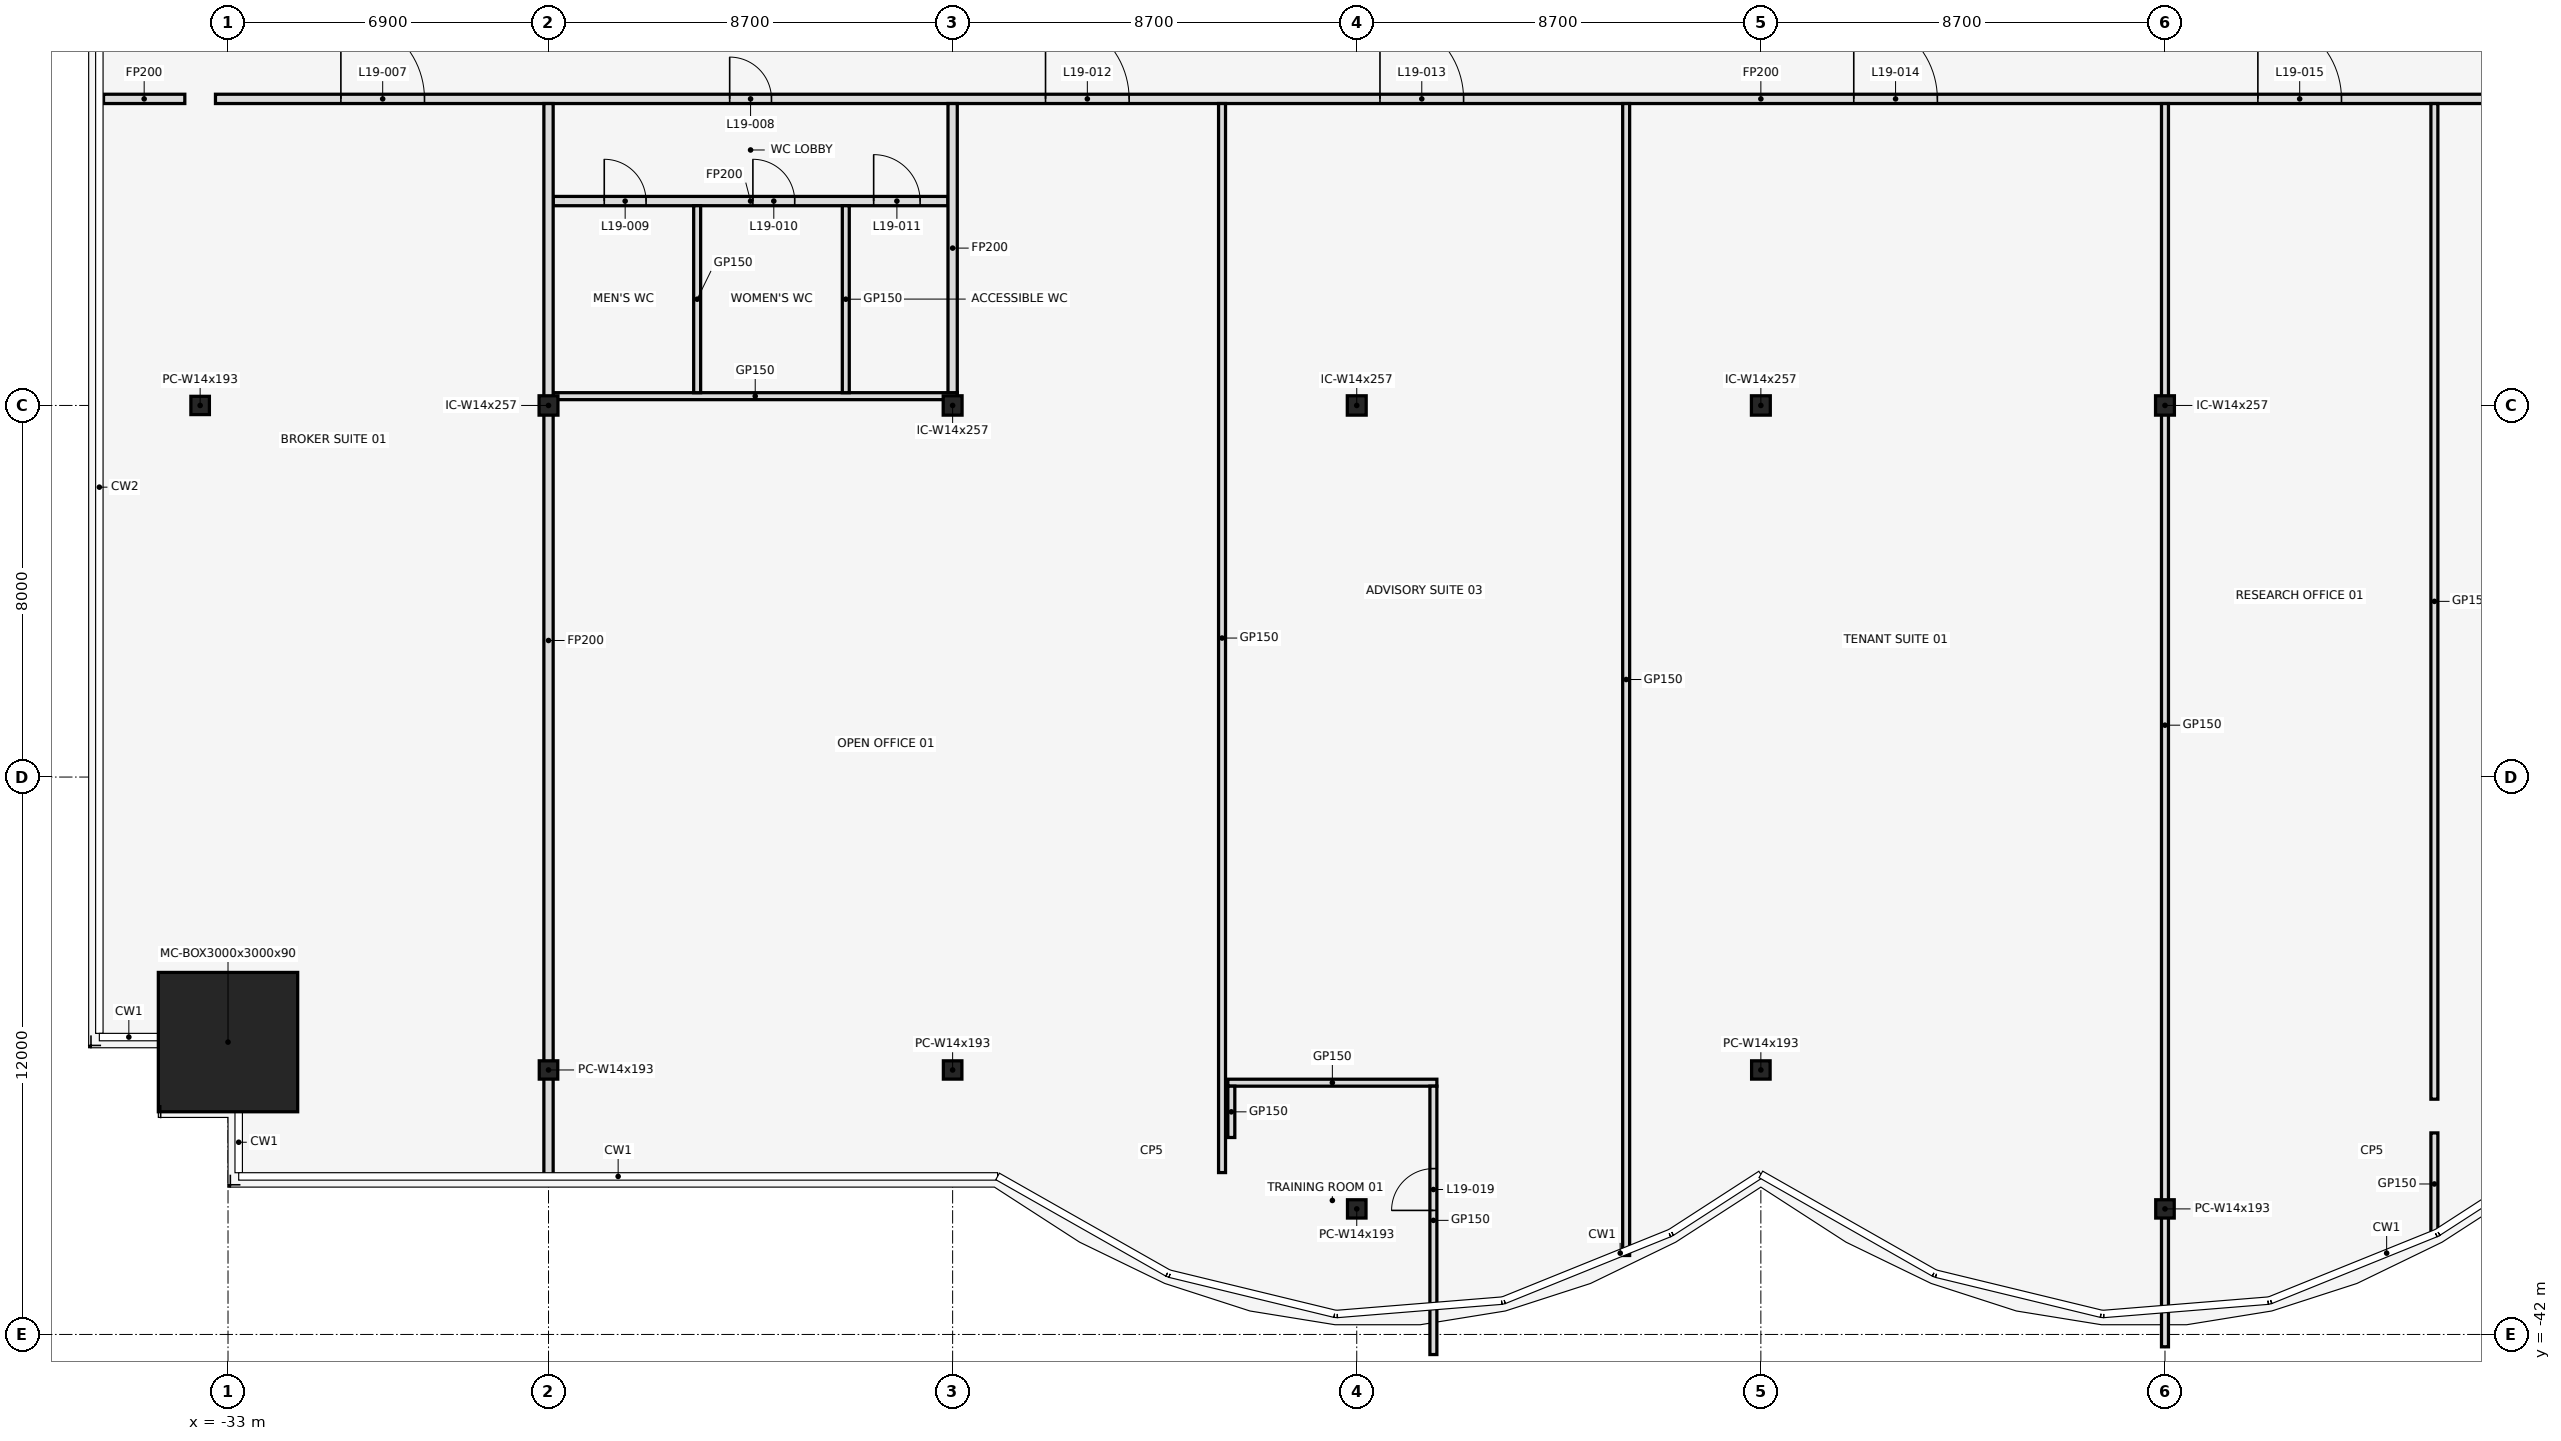
"""IFC4 building model, lengths in metres.
Left out: names, types, materials, properties, quantities, classifications, styles, units other than length and angle.
Written with IfcOpenShell. Run it as: python <this file> out.ifc"""

import sys

from ifc_helpers import new_model, si_unit, direction, frame, frame_2d, origin, origin_2d, place, context, subcontext, project, spatial, rectangle, hollow_rectangle, i_section, extrude, element, fill, save


model = new_model("IFC4")
c1 = context("Model", 3, precision=1e-05, world=origin(), true_north=direction((0.0, 1.0)))
c2 = subcontext(c1, "Body", "Model", "MODEL_VIEW")
j1 = project(units=[si_unit("LENGTHUNIT", "METRE"), si_unit("PLANEANGLEUNIT", "RADIAN")], contexts=[c1])
p1 = place(None, origin())
s1 = spatial("IfcSite", under=j1, at=p1, CompositionType="ELEMENT")
p2 = place(p1, origin())
s2 = spatial("IfcBuilding", under=s1, at=p2, CompositionType="ELEMENT")
p3 = place(p2, frame((0.0, 0.0, 94.0)))
s3 = spatial("IfcBuildingStorey", under=s2, at=p3, CompositionType="ELEMENT", Elevation=94.0)
p4 = place(p3, frame((-33.0, -35.706, 0.0), z_axis=(0.0, 0.0, 1.0), x_axis=(1.0, 0.0, 0.0)))
e1 = element("IfcColumn", 1, at=p4, inside=s3, PredefinedType="COLUMN", context=c2, shape_type="SweptSolid", body=[
    extrude(hollow_rectangle(XDim=3.0, YDim=3.0, WallThickness=0.09, at=origin_2d()), origin(), (0.0, 0.0, 1.0), 4.1),
])
for number, where, z_axis, x_axis in (
    (2, (-26.1, -36.306, 0.0), (0.0, 0.0, 1.0), (1.0, 0.0, 0.0)),
    (3, (-17.4, -36.306, 0.0), (0.0, 0.0, 1.0), (1.0, 0.0, 0.0)),
    (4, (-8.7, -39.297, 0.0), (0.0, 0.0, 1.0), (1.0, 0.0, 0.0)),
    (5, (0.0, -36.306, 0.0), (0.0, 0.0, 1.0), (1.0, 0.0, 0.0)),
    (6, (8.7, -39.297, 0.0), (0.0, 0.0, 1.0), (1.0, 0.0, 0.0)),
    (7, (-33.6, -22.0, 0.0), (0.0, 0.0, 1.0), (1.0, 0.0, 0.0)),
):
    element("IfcColumn", number, at=place(p3, frame(where, z_axis=z_axis, x_axis=x_axis)), inside=s3, PredefinedType="COLUMN", context=c2, shape_type="SweptSolid", body=[
        extrude(i_section(OverallWidth=0.399, OverallDepth=0.394, WebThickness=0.023, FlangeThickness=0.037, at=origin_2d()), origin(), (0.0, 0.0, 1.0), 4.1),
    ])
for number, where, z_axis, x_axis in (
    (8, (-26.1, -22.0, 0.0), (0.0, 0.0, 1.0), (1.0, 0.0, 0.0)),
    (9, (-17.4, -22.0, 0.0), (0.0, 0.0, 1.0), (1.0, 0.0, 0.0)),
    (10, (-8.7, -22.0, 0.0), (0.0, 0.0, 1.0), (1.0, 0.0, 0.0)),
    (11, (0.0, -22.0, 0.0), (0.0, 0.0, 1.0), (1.0, 0.0, 0.0)),
    (12, (8.7, -22.0, 0.0), (0.0, 0.0, 1.0), (1.0, 0.0, 0.0)),
):
    element("IfcColumn", number, at=place(p3, frame(where, z_axis=z_axis, x_axis=x_axis)), inside=s3, PredefinedType="COLUMN", context=c2, shape_type="SweptSolid", body=[
        extrude(i_section(OverallWidth=0.406, OverallDepth=0.417, WebThickness=0.03, FlangeThickness=0.048, at=origin_2d()), origin(), (0.0, 0.0, 1.0), 4.1),
    ])
p5 = place(p3, frame((-11.475, -36.58, 0.0), z_axis=(0.0, 0.0, 1.0), x_axis=(1.0, 0.0, 0.0)))
e13 = element("IfcWall", 13, at=p5, inside=s3, PredefinedType="PARTITIONING", context=c2, shape_type="SweptSolid", body=[
    extrude(rectangle(XDim=4.5, YDim=0.15, at=frame_2d((2.25, 0.0))), origin(), (0.0, 0.0, 1.0), 3.018),
])
p6 = place(p3, frame((-26.0, -21.8, 0.0), z_axis=(0.0, 0.0, 1.0), x_axis=(1.0, 0.0, 0.0)))
e14 = element("IfcWall", 14, at=p6, inside=s3, PredefinedType="PARTITIONING", context=c2, shape_type="SweptSolid", body=[
    extrude(rectangle(XDim=8.7, YDim=0.15, at=frame_2d((4.35, 0.0))), origin(), (0.0, 0.0, 1.0), 3.018),
])
p7 = place(p3, frame((-26.0, -17.6, 0.0), z_axis=(0.0, 0.0, 1.0), x_axis=(1.0, 0.0, 0.0)))
e15 = element("IfcWall", 15, at=p7, inside=s3, PredefinedType="PARTITIONING", context=c2, shape_type="SweptSolid", body=[
    extrude(rectangle(XDim=8.5, YDim=0.2, at=frame_2d((4.25, 0.0))), origin(), (0.0, 0.0, 1.0), 3.018),
])
p8 = place(p7, frame((1.1, 0.0, 0.0)))
e16 = element("IfcOpeningElement", 16, at=p8, cuts=e15, PredefinedType="OPENING", context=c2, shape_type="SweptSolid", body=[
    extrude(rectangle(XDim=0.9, YDim=2.1, at=frame_2d((0.45, 1.05))), frame((0.0, 0.112, 0.0), z_axis=(0.0, -1.0, 0.0), x_axis=(1.0, 0.0, 0.0)), (0.0, 0.0, 1.0), 0.224),
])
p9 = place(p7, frame((4.3, 0.0, 0.0)))
e17 = element("IfcOpeningElement", 17, at=p9, cuts=e15, PredefinedType="OPENING", context=c2, shape_type="SweptSolid", body=[
    extrude(rectangle(XDim=0.9, YDim=2.1, at=frame_2d((0.45, 1.05))), frame((0.0, 0.112, 0.0), z_axis=(0.0, -1.0, 0.0), x_axis=(1.0, 0.0, 0.0)), (0.0, 0.0, 1.0), 0.224),
])
p10 = place(p7, frame((6.9, 0.0, 0.0)))
e18 = element("IfcOpeningElement", 18, at=p10, cuts=e15, PredefinedType="OPENING", context=c2, shape_type="SweptSolid", body=[
    extrude(rectangle(XDim=1.0, YDim=2.1, at=frame_2d((0.5, 1.05))), frame((0.0, 0.112, 0.0), z_axis=(0.0, -1.0, 0.0), x_axis=(1.0, 0.0, 0.0)), (0.0, 0.0, 1.0), 0.224),
])
p11 = place(p3, frame((-35.68, -15.4, 0.0), z_axis=(0.0, 0.0, 1.0), x_axis=(1.0, 0.0, 0.0)))
e19 = element("IfcWall", 19, at=p11, inside=s3, PredefinedType="PARTITIONING", context=c2, shape_type="SweptSolid", body=[
    extrude(rectangle(XDim=1.75, YDim=0.2, at=frame_2d((0.875, 0.0))), origin(), (0.0, 0.0, 1.0), 3.018),
])
p12 = place(p3, frame((-33.27, -15.4, 0.0), z_axis=(0.0, 0.0, 1.0), x_axis=(1.0, 0.0, 0.0)))
e20 = element("IfcWall", 20, at=p12, inside=s3, PredefinedType="PARTITIONING", context=c2, shape_type="SweptSolid", body=[
    extrude(rectangle(XDim=66.54, YDim=0.2, at=frame_2d((33.27, 0.0))), origin(), (0.0, 0.0, 1.0), 3.018),
])
p13 = place(p12, frame((2.7, 0.0, 0.0)))
e21 = element("IfcOpeningElement", 21, at=p13, cuts=e20, PredefinedType="OPENING", context=c2, shape_type="SweptSolid", body=[
    extrude(rectangle(XDim=1.8, YDim=2.1, at=frame_2d((0.9, 1.05))), frame((0.0, 0.112, 0.0), z_axis=(0.0, -1.0, 0.0), x_axis=(1.0, 0.0, 0.0)), (0.0, 0.0, 1.0), 0.224),
])
p14 = place(p12, frame((11.07, 0.0, 0.0)))
e22 = element("IfcOpeningElement", 22, at=p14, cuts=e20, PredefinedType="OPENING", context=c2, shape_type="SweptSolid", body=[
    extrude(rectangle(XDim=0.9, YDim=2.1, at=frame_2d((0.45, 1.05))), frame((0.0, 0.112, 0.0), z_axis=(0.0, -1.0, 0.0), x_axis=(1.0, 0.0, 0.0)), (0.0, 0.0, 1.0), 0.224),
])
p15 = place(p12, frame((17.87, 0.0, 0.0)))
e23 = element("IfcOpeningElement", 23, at=p15, cuts=e20, PredefinedType="OPENING", context=c2, shape_type="SweptSolid", body=[
    extrude(rectangle(XDim=1.8, YDim=2.1, at=frame_2d((0.9, 1.05))), frame((0.0, 0.112, 0.0), z_axis=(0.0, -1.0, 0.0), x_axis=(1.0, 0.0, 0.0)), (0.0, 0.0, 1.0), 0.224),
])
p16 = place(p12, frame((25.07, 0.0, 0.0)))
e24 = element("IfcOpeningElement", 24, at=p16, cuts=e20, PredefinedType="OPENING", context=c2, shape_type="SweptSolid", body=[
    extrude(rectangle(XDim=1.8, YDim=2.1, at=frame_2d((0.9, 1.05))), frame((0.0, 0.112, 0.0), z_axis=(0.0, -1.0, 0.0), x_axis=(1.0, 0.0, 0.0)), (0.0, 0.0, 1.0), 0.224),
])
p17 = place(p12, frame((35.27, 0.0, 0.0)))
e25 = element("IfcOpeningElement", 25, at=p17, cuts=e20, PredefinedType="OPENING", context=c2, shape_type="SweptSolid", body=[
    extrude(rectangle(XDim=1.8, YDim=2.1, at=frame_2d((0.9, 1.05))), frame((0.0, 0.112, 0.0), z_axis=(0.0, -1.0, 0.0), x_axis=(1.0, 0.0, 0.0)), (0.0, 0.0, 1.0), 0.224),
])
p18 = place(p12, frame((43.97, 0.0, 0.0)))
e26 = element("IfcOpeningElement", 26, at=p18, cuts=e20, PredefinedType="OPENING", context=c2, shape_type="SweptSolid", body=[
    extrude(rectangle(XDim=1.8, YDim=2.1, at=frame_2d((0.9, 1.05))), frame((0.0, 0.112, 0.0), z_axis=(0.0, -1.0, 0.0), x_axis=(1.0, 0.0, 0.0)), (0.0, 0.0, 1.0), 0.224),
])
p19 = place(p12, frame((49.77, 0.0, 0.0)))
e27 = element("IfcOpeningElement", 27, at=p19, cuts=e20, PredefinedType="OPENING", context=c2, shape_type="SweptSolid", body=[
    extrude(rectangle(XDim=1.8, YDim=2.1, at=frame_2d((0.9, 1.05))), frame((0.0, 0.112, 0.0), z_axis=(0.0, -1.0, 0.0), x_axis=(1.0, 0.0, 0.0)), (0.0, 0.0, 1.0), 0.224),
])
p20 = place(p12, frame((55.57, 0.0, 0.0)))
e28 = element("IfcOpeningElement", 28, at=p20, cuts=e20, PredefinedType="OPENING", context=c2, shape_type="SweptSolid", body=[
    extrude(rectangle(XDim=1.8, YDim=2.1, at=frame_2d((0.9, 1.05))), frame((0.0, 0.112, 0.0), z_axis=(0.0, -1.0, 0.0), x_axis=(1.0, 0.0, 0.0)), (0.0, 0.0, 1.0), 0.224),
])
p21 = place(p12, frame((62.07, 0.0, 0.0)))
e29 = element("IfcOpeningElement", 29, at=p21, cuts=e20, PredefinedType="OPENING", context=c2, shape_type="SweptSolid", body=[
    extrude(rectangle(XDim=1.8, YDim=2.1, at=frame_2d((0.9, 1.05))), frame((0.0, 0.112, 0.0), z_axis=(0.0, -1.0, 0.0), x_axis=(1.0, 0.0, 0.0)), (0.0, 0.0, 1.0), 0.224),
])
p22 = place(p3, frame((-26.1, -38.62, 0.0), z_axis=(0.0, 0.0, 1.0), x_axis=(0.0, 1.0, 0.0)))
e30 = element("IfcWall", 30, at=p22, inside=s3, PredefinedType="PARTITIONING", context=c2, shape_type="SweptSolid", body=[
    extrude(rectangle(XDim=23.12, YDim=0.2, at=frame_2d((11.56, 0.0))), origin(), (0.0, 0.0, 1.0), 3.018),
])
for number, where, z_axis, x_axis in (
    (31, (-22.9, -21.725, 0.0), (0.0, 0.0, 1.0), (0.0, 1.0, 0.0)),
    (32, (-19.7, -21.725, 0.0), (0.0, 0.0, 1.0), (0.0, 1.0, 0.0)),
):
    element("IfcWall", number, at=place(p3, frame(where, z_axis=z_axis, x_axis=x_axis)), inside=s3, PredefinedType="PARTITIONING", context=c2, shape_type="SweptSolid", body=[
        extrude(rectangle(XDim=4.025, YDim=0.15, at=frame_2d((2.013, 0.0))), origin(), (0.0, 0.0, 1.0), 3.018),
    ])
p23 = place(p3, frame((-17.4, -21.725, 0.0), z_axis=(0.0, 0.0, 1.0), x_axis=(0.0, 1.0, 0.0)))
e33 = element("IfcWall", 33, at=p23, inside=s3, PredefinedType="PARTITIONING", context=c2, shape_type="SweptSolid", body=[
    extrude(rectangle(XDim=6.225, YDim=0.2, at=frame_2d((3.113, 0.0))), origin(), (0.0, 0.0, 1.0), 3.018),
])
p24 = place(p3, frame((-11.6, -38.515, 0.0), z_axis=(0.0, 0.0, 1.0), x_axis=(0.0, 1.0, 0.0)))
e34 = element("IfcWall", 34, at=p24, inside=s3, PredefinedType="PARTITIONING", context=c2, shape_type="SweptSolid", body=[
    extrude(rectangle(XDim=23.015, YDim=0.15, at=frame_2d((11.508, 0.0))), origin(), (0.0, 0.0, 1.0), 3.018),
])
p25 = place(p3, frame((-11.4, -37.76, 0.0), z_axis=(0.0, 0.0, 1.0), x_axis=(0.0, 1.0, 0.0)))
e35 = element("IfcWall", 35, at=p25, inside=s3, PredefinedType="PARTITIONING", context=c2, shape_type="SweptSolid", body=[
    extrude(rectangle(XDim=1.105, YDim=0.15, at=frame_2d((0.552, 0.0))), origin(), (0.0, 0.0, 1.0), 3.018),
])
p26 = place(p3, frame((-7.05, -42.433, 0.0), z_axis=(0.0, 0.0, 1.0), x_axis=(0.0, 1.0, 0.0)))
e36 = element("IfcWall", 36, at=p26, inside=s3, PredefinedType="PARTITIONING", context=c2, shape_type="SweptSolid", body=[
    extrude(rectangle(XDim=5.778, YDim=0.15, at=frame_2d((2.889, 0.0))), origin(), (0.0, 0.0, 1.0), 3.018),
])
p27 = place(p26, frame((3.103, 0.0, 0.0)))
e37 = element("IfcOpeningElement", 37, at=p27, cuts=e36, PredefinedType="OPENING", context=c2, shape_type="SweptSolid", body=[
    extrude(rectangle(XDim=0.9, YDim=2.1, at=frame_2d((0.45, 1.05))), frame((0.0, 0.087, 0.0), z_axis=(0.0, -1.0, 0.0), x_axis=(1.0, 0.0, 0.0)), (0.0, 0.0, 1.0), 0.174),
])
p28 = place(p3, frame((-2.9, -40.3, 0.0), z_axis=(0.0, 0.0, 1.0), x_axis=(0.0, 1.0, 0.0)))
e38 = element("IfcWall", 38, at=p28, inside=s3, PredefinedType="PARTITIONING", context=c2, shape_type="SweptSolid", body=[
    extrude(rectangle(XDim=24.8, YDim=0.15, at=frame_2d((12.4, 0.0))), origin(), (0.0, 0.0, 1.0), 3.018),
])
p29 = place(p3, frame((8.7, -42.266, 0.0), z_axis=(0.0, 0.0, 1.0), x_axis=(0.0, 1.0, 0.0)))
e39 = element("IfcWall", 39, at=p29, inside=s3, PredefinedType="PARTITIONING", context=c2, shape_type="SweptSolid", body=[
    extrude(rectangle(XDim=26.766, YDim=0.15, at=frame_2d((13.383, 0.0))), origin(), (0.0, 0.0, 1.0), 3.018),
])
p30 = place(p3, frame((14.5, -39.86, 0.0), z_axis=(0.0, 0.0, 1.0), x_axis=(0.0, 1.0, 0.0)))
e40 = element("IfcWall", 40, at=p30, inside=s3, PredefinedType="PARTITIONING", context=c2, shape_type="SweptSolid", body=[
    extrude(rectangle(XDim=2.199, YDim=0.15, at=frame_2d((1.1, 0.0))), origin(), (0.0, 0.0, 1.0), 3.018),
])
p31 = place(p3, frame((14.5, -36.935, 0.0), z_axis=(0.0, 0.0, 1.0), x_axis=(0.0, 1.0, 0.0)))
e41 = element("IfcWall", 41, at=p31, inside=s3, PredefinedType="PARTITIONING", context=c2, shape_type="SweptSolid", body=[
    extrude(rectangle(XDim=21.435, YDim=0.15, at=frame_2d((10.718, 0.0))), origin(), (0.0, 0.0, 1.0), 3.018),
])
p32 = place(p13, origin())
e42 = element("IfcDoor", 42, at=p32, inside=s3, OperationType="SINGLE_SWING_LEFT", PredefinedType="DOOR", context=c2, shape_type="SweptSolid", body=[
    extrude(rectangle(XDim=1.8, YDim=2.1, at=frame_2d((0.9, 1.05))), frame((0.0, 0.025, 0.0), z_axis=(0.0, -1.0, 0.0), x_axis=(1.0, 0.0, 0.0)), (0.0, 0.0, 1.0), 0.05),
])
fill(e21, e42)
p33 = place(p14, frame((0.9, 0.0, 0.0), z_axis=(0.0, 0.0, 1.0), x_axis=(-1.0, 0.0, 0.0)))
e43 = element("IfcDoor", 43, at=p33, inside=s3, OperationType="SINGLE_SWING_RIGHT", PredefinedType="DOOR", context=c2, shape_type="SweptSolid", body=[
    extrude(rectangle(XDim=0.9, YDim=2.1, at=frame_2d((0.45, 1.05))), frame((0.0, 0.025, 0.0), z_axis=(0.0, -1.0, 0.0), x_axis=(1.0, 0.0, 0.0)), (0.0, 0.0, 1.0), 0.05),
])
fill(e22, e43)
p34 = place(p8, frame((0.9, 0.0, 0.0), z_axis=(0.0, 0.0, 1.0), x_axis=(-1.0, 0.0, 0.0)))
e44 = element("IfcDoor", 44, at=p34, inside=s3, OperationType="SINGLE_SWING_RIGHT", PredefinedType="DOOR", context=c2, shape_type="SweptSolid", body=[
    extrude(rectangle(XDim=0.9, YDim=2.1, at=frame_2d((0.45, 1.05))), frame((0.0, 0.025, 0.0), z_axis=(0.0, -1.0, 0.0), x_axis=(1.0, 0.0, 0.0)), (0.0, 0.0, 1.0), 0.05),
])
fill(e16, e44)
p35 = place(p9, frame((0.9, 0.0, 0.0), z_axis=(0.0, 0.0, 1.0), x_axis=(-1.0, 0.0, 0.0)))
e45 = element("IfcDoor", 45, at=p35, inside=s3, OperationType="SINGLE_SWING_LEFT", PredefinedType="DOOR", context=c2, shape_type="SweptSolid", body=[
    extrude(rectangle(XDim=0.9, YDim=2.1, at=frame_2d((0.45, 1.05))), frame((0.0, 0.025, 0.0), z_axis=(0.0, -1.0, 0.0), x_axis=(1.0, 0.0, 0.0)), (0.0, 0.0, 1.0), 0.05),
])
fill(e17, e45)
p36 = place(p10, frame((1.0, 0.0, 0.0), z_axis=(0.0, 0.0, 1.0), x_axis=(-1.0, 0.0, 0.0)))
e46 = element("IfcDoor", 46, at=p36, inside=s3, OperationType="SINGLE_SWING_RIGHT", PredefinedType="DOOR", context=c2, shape_type="SweptSolid", body=[
    extrude(rectangle(XDim=1.0, YDim=2.1, at=frame_2d((0.5, 1.05))), frame((0.0, 0.025, 0.0), z_axis=(0.0, -1.0, 0.0), x_axis=(1.0, 0.0, 0.0)), (0.0, 0.0, 1.0), 0.05),
])
fill(e18, e46)
p37 = place(p15, origin())
e47 = element("IfcDoor", 47, at=p37, inside=s3, OperationType="SINGLE_SWING_LEFT", PredefinedType="DOOR", context=c2, shape_type="SweptSolid", body=[
    extrude(rectangle(XDim=1.8, YDim=2.1, at=frame_2d((0.9, 1.05))), frame((0.0, 0.025, 0.0), z_axis=(0.0, -1.0, 0.0), x_axis=(1.0, 0.0, 0.0)), (0.0, 0.0, 1.0), 0.05),
])
fill(e23, e47)
p38 = place(p16, origin())
e48 = element("IfcDoor", 48, at=p38, inside=s3, OperationType="SINGLE_SWING_LEFT", PredefinedType="DOOR", context=c2, shape_type="SweptSolid", body=[
    extrude(rectangle(XDim=1.8, YDim=2.1, at=frame_2d((0.9, 1.05))), frame((0.0, 0.025, 0.0), z_axis=(0.0, -1.0, 0.0), x_axis=(1.0, 0.0, 0.0)), (0.0, 0.0, 1.0), 0.05),
])
fill(e24, e48)
p39 = place(p17, origin())
e49 = element("IfcDoor", 49, at=p39, inside=s3, OperationType="SINGLE_SWING_LEFT", PredefinedType="DOOR", context=c2, shape_type="SweptSolid", body=[
    extrude(rectangle(XDim=1.8, YDim=2.1, at=frame_2d((0.9, 1.05))), frame((0.0, 0.025, 0.0), z_axis=(0.0, -1.0, 0.0), x_axis=(1.0, 0.0, 0.0)), (0.0, 0.0, 1.0), 0.05),
])
fill(e25, e49)
p40 = place(p18, origin())
e50 = element("IfcDoor", 50, at=p40, inside=s3, OperationType="SINGLE_SWING_LEFT", PredefinedType="DOOR", context=c2, shape_type="SweptSolid", body=[
    extrude(rectangle(XDim=1.8, YDim=2.1, at=frame_2d((0.9, 1.05))), frame((0.0, 0.025, 0.0), z_axis=(0.0, -1.0, 0.0), x_axis=(1.0, 0.0, 0.0)), (0.0, 0.0, 1.0), 0.05),
])
fill(e26, e50)
p41 = place(p27, origin())
e51 = element("IfcDoor", 51, at=p41, inside=s3, OperationType="SINGLE_SWING_LEFT", PredefinedType="DOOR", context=c2, shape_type="SweptSolid", body=[
    extrude(rectangle(XDim=0.9, YDim=2.1, at=frame_2d((0.45, 1.05))), frame((0.0, 0.025, 0.0), z_axis=(0.0, -1.0, 0.0), x_axis=(1.0, 0.0, 0.0)), (0.0, 0.0, 1.0), 0.05),
])
fill(e37, e51)
save(model, sys.argv[1])
